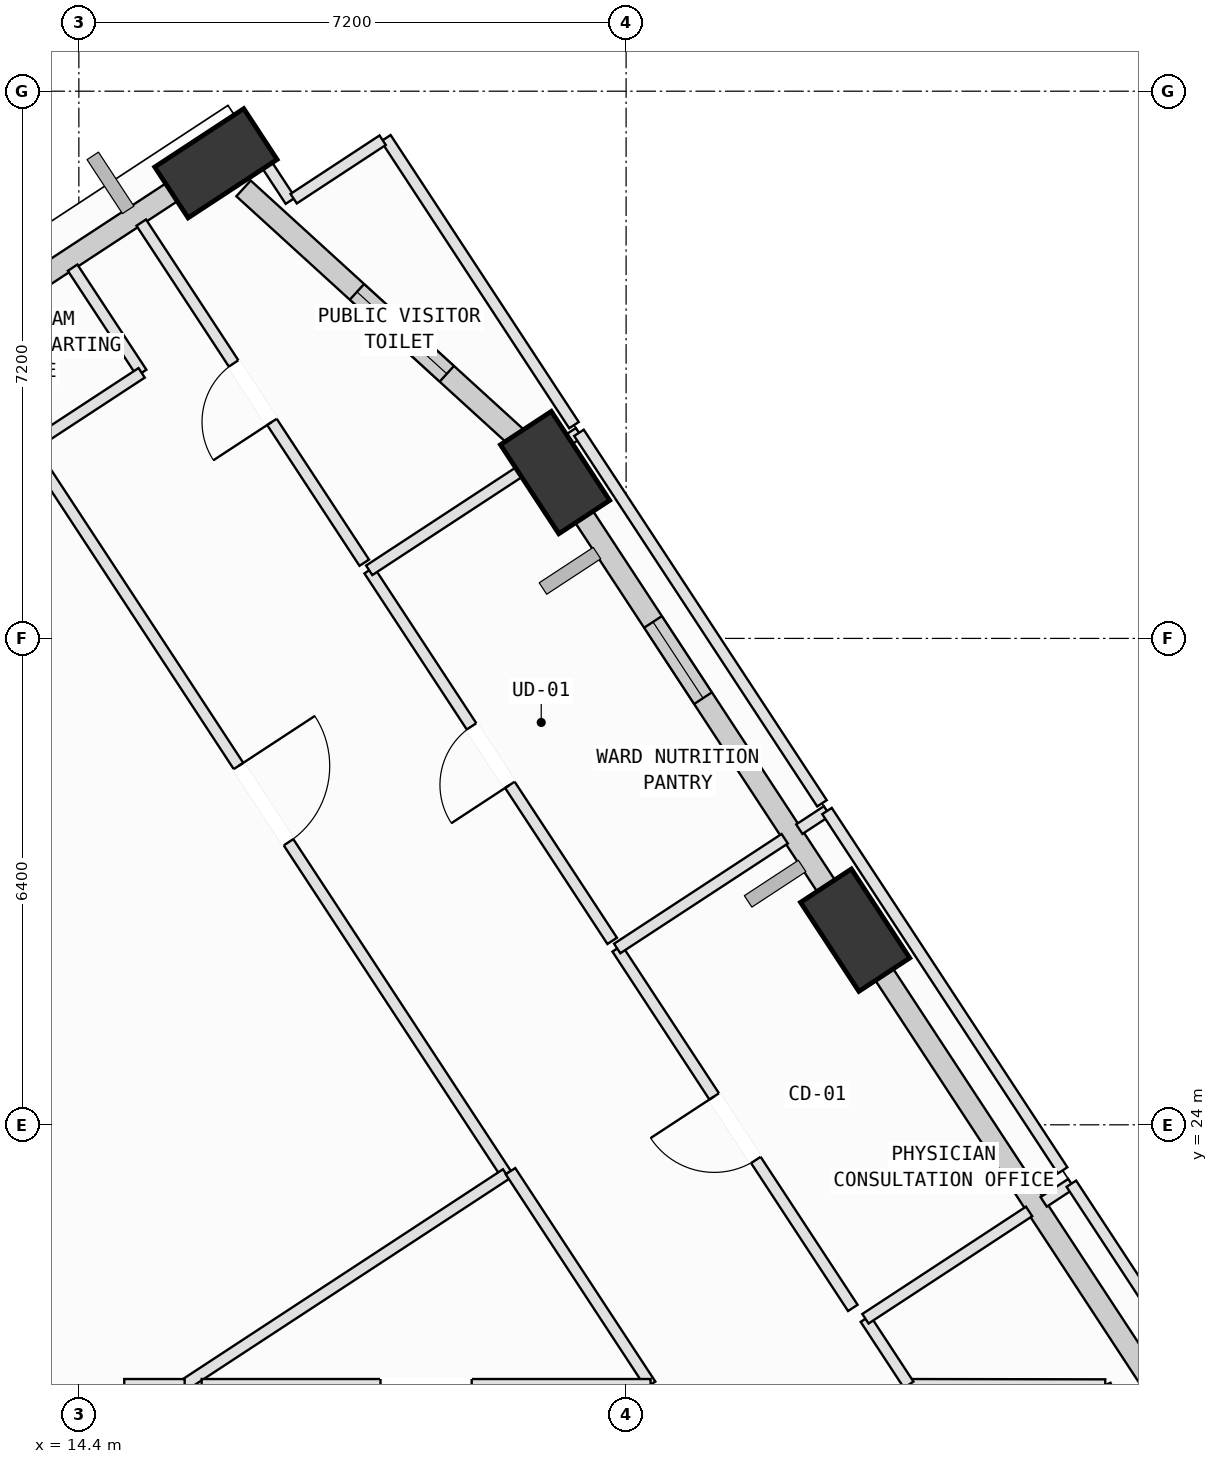
"""IFC4 building model, lengths in metres.
Left out: names, types, materials, properties, quantities, classifications, styles, units other than length and angle.
Written with IfcOpenShell. Run it as: python <this file> out.ifc"""

import sys

from ifc_helpers import new_model, si_unit, direction, frame, frame_2d, origin, origin_2d, place, context, subcontext, project, spatial, rectangle, extrude, element, fill, save


model = new_model("IFC4")
c1 = context("Model", 3, precision=1e-05, world=origin(), true_north=direction((0.0, 1.0)))
c2 = subcontext(c1, "Body", "Model", "MODEL_VIEW")
j1 = project(units=[si_unit("LENGTHUNIT", "METRE"), si_unit("PLANEANGLEUNIT", "RADIAN")], contexts=[c1])
p1 = place(None, origin())
s1 = spatial("IfcSite", under=j1, at=p1, CompositionType="ELEMENT")
p2 = place(p1, origin())
s2 = spatial("IfcBuilding", under=s1, at=p2, CompositionType="ELEMENT")
p3 = place(p2, frame((0.0, 0.0, 165.8)))
s3 = spatial("IfcBuildingStorey", under=s2, at=p3, CompositionType="ELEMENT", Elevation=165.8)
p4 = place(p3, frame((28.863, 20.08, 0.002), z_axis=(0.019724836791, -0.019480566367, 0.99961564531), x_axis=(-0.553225254665, 0.832589411518, 0.027142023308)))
e1 = element("IfcColumn", 1, at=p4, inside=s3, PredefinedType="COLUMN", context=c2, shape_type="SweptSolid", body=[
    extrude(rectangle(XDim=1.4, YDim=0.8, at=origin_2d()), origin(), (0.0, 0.0, 1.0), 3.998),
])
p5 = place(p3, frame((24.613, 26.561, 0.002), z_axis=(-0.007020412857, -0.037299758743, 0.999279461313), x_axis=(-0.384257200508, 0.922680288149, 0.031740978557)))
e2 = element("IfcColumn", 2, at=p5, inside=s3, PredefinedType="COLUMN", context=c2, shape_type="SweptSolid", body=[
    extrude(rectangle(XDim=1.4, YDim=0.8, at=origin_2d()), origin(), (0.0, 0.0, 1.0), 3.999),
])
p6 = place(p3, frame((20.666, 32.582, 0.002), z_axis=(-0.031766312901, -0.053777136236, 0.99804755447), x_axis=(-0.047579985119, 0.997500791827, 0.052233277912)))
e3 = element("IfcColumn", 3, at=p6, inside=s3, PredefinedType="COLUMN", context=c2, shape_type="SweptSolid", body=[
    extrude(rectangle(XDim=1.4, YDim=0.8, at=origin_2d()), origin(), (0.0, 0.0, 1.0), 4.004),
])
p7 = place(p3, frame((16.204, 36.652, 0.002), z_axis=(-0.048383489363, -0.072240505501, 0.996213002988), x_axis=(0.998796364309, -0.011541167094, 0.047672047424)))
e4 = element("IfcColumn", 4, at=p7, inside=s3, PredefinedType="COLUMN", context=c2, shape_type="SweptSolid", body=[
    extrude(rectangle(XDim=1.4, YDim=0.8, at=origin_2d()), origin(), (0.0, 0.0, 1.0), 4.011),
])
p8 = place(p3, frame((28.62, 20.449, 0.0), z_axis=(0.0, 0.0, 1.0), x_axis=(-0.548274567117, 0.836298391158, 0.0)))
e5 = element("IfcWall", 5, at=p8, inside=s3, PredefinedType="SOLIDWALL", context=c2, shape_type="SweptSolid", body=[
    extrude(rectangle(XDim=6.76, YDim=0.28, at=frame_2d((3.38, 0.0))), origin(), (0.0, 0.0, 1.0), 3.165),
])
p9 = place(p3, frame((24.373, 26.928, 0.0), z_axis=(0.0, 0.0, 1.0), x_axis=(-0.548310186412, 0.836275038176, 0.0)))
e6 = element("IfcWall", 6, at=p9, inside=s3, PredefinedType="SOLIDWALL", context=c2, shape_type="SweptSolid", body=[
    extrude(rectangle(XDim=6.223, YDim=0.28, at=frame_2d((3.111, 0.0))), origin(), (0.0, 0.0, 1.0), 3.165),
])
p10 = place(p9, frame((3.211, 0.0, 0.75)))
e7 = element("IfcOpeningElement", 7, at=p10, cuts=e6, PredefinedType="OPENING", context=c2, shape_type="SweptSolid", body=[
    extrude(rectangle(XDim=1.2, YDim=1.75, at=frame_2d((0.6, 0.875))), frame((0.0, 0.15, 0.0), z_axis=(0.0, -1.0, 0.0), x_axis=(1.0, 0.0, 0.0)), (0.0, 0.0, 1.0), 0.3),
])
p11 = place(p3, frame((16.567, 36.321, 0.0), z_axis=(0.0, 0.0, 1.0), x_axis=(0.738817531131, -0.673905524308, 0.0)))
e8 = element("IfcWall", 8, at=p11, inside=s3, PredefinedType="SOLIDWALL", context=c2, shape_type="SweptSolid", body=[
    extrude(rectangle(XDim=5.093, YDim=0.28, at=frame_2d((2.546, 0.0))), origin(), (0.0, 0.0, 1.0), 3.165),
])
p12 = place(p11, frame((2.02, 0.0, 0.75)))
e9 = element("IfcOpeningElement", 9, at=p12, cuts=e8, PredefinedType="OPENING", context=c2, shape_type="SweptSolid", body=[
    extrude(rectangle(XDim=1.6, YDim=1.95, at=frame_2d((0.8, 0.975))), frame((0.0, 0.15, 0.0), z_axis=(0.0, -1.0, 0.0), x_axis=(1.0, 0.0, 0.0)), (0.0, 0.0, 1.0), 0.3),
])
p13 = place(p3, frame((9.611, 32.33, 0.0), z_axis=(0.0, 0.0, 1.0), x_axis=(0.836290304758, 0.548286901327, 0.0)))
e10 = element("IfcWall", 10, at=p13, inside=s3, PredefinedType="SOLIDWALL", context=c2, shape_type="SweptSolid", body=[
    extrude(rectangle(XDim=7.231, YDim=0.28, at=frame_2d((3.615, 0.0))), origin(), (0.0, 0.0, 1.0), 3.165),
])
p14 = place(p3, frame((13.638, 33.087, 0.0), z_axis=(0.0, 0.0, 1.0), x_axis=(0.548329312424, -0.836262497746, 0.0)))
e11 = element("IfcWall", 11, at=p14, inside=s3, PredefinedType="PARTITIONING", context=c2, shape_type="SweptSolid", body=[
    extrude(rectangle(XDim=11.641, YDim=0.15, at=frame_2d((5.82, 0.0))), origin(), (0.0, 0.0, 1.0), 3.78),
])
p15 = place(p14, frame((5.22, 0.0, 0.0)))
e12 = element("IfcOpeningElement", 12, at=p15, cuts=e11, PredefinedType="OPENING", context=c2, shape_type="SweptSolid", body=[
    extrude(rectangle(XDim=1.2, YDim=2.15, at=frame_2d((0.6, 1.075))), frame((0.0, 0.085, 0.0), z_axis=(0.0, -1.0, 0.0), x_axis=(1.0, 0.0, 0.0)), (0.0, 0.0, 1.0), 0.17),
])
p16 = place(p3, frame((20.021, 23.352, 0.0), z_axis=(0.0, 0.0, 1.0), x_axis=(-0.836348158254, -0.548198648471, 0.0)))
e13 = element("IfcWall", 13, at=p16, inside=s3, PredefinedType="PARTITIONING", context=c2, shape_type="SweptSolid", body=[
    extrude(rectangle(XDim=5.056, YDim=0.15, at=frame_2d((2.528, 0.0))), origin(), (0.0, 0.0, 1.0), 3.78),
])
p17 = place(p3, frame((15.792, 20.58, 0.0), z_axis=(0.0, 0.0, 1.0), x_axis=(-1.0, 0.0, 0.0)))
e14 = element("IfcWall", 14, at=p17, inside=s3, PredefinedType="PARTITIONING", context=c2, shape_type="SweptSolid", body=[
    extrude(rectangle(XDim=0.795, YDim=0.15, at=frame_2d((0.397, 0.0))), origin(), (0.0, 0.0, 1.0), 3.78),
])
p18 = place(p3, frame((28.096, 20.131, 0.0), z_axis=(0.0, 0.0, 1.0), x_axis=(-0.396107773703, 0.918204025047, 0.0)))
e15 = element("IfcWall", 15, at=p18, inside=s3, PredefinedType="PARTITIONING", context=c2, shape_type="SweptSolid", body=[
    extrude(rectangle(XDim=0.484, YDim=0.15, at=frame_2d((0.242, 0.0))), origin(), (0.0, 0.0, 1.0), 3.78),
])
p19 = place(p3, frame((27.904, 20.576, 0.0), z_axis=(0.0, 0.0, 1.0), x_axis=(-0.999998712014, 0.001604982827, 0.0)))
e16 = element("IfcWall", 16, at=p19, inside=s3, PredefinedType="PARTITIONING", context=c2, shape_type="SweptSolid", body=[
    extrude(rectangle(XDim=2.586, YDim=0.15, at=frame_2d((1.293, 0.0))), origin(), (0.0, 0.0, 1.0), 3.78),
])
p20 = place(p3, frame((25.318, 20.58, 0.0), z_axis=(0.0, 0.0, 1.0), x_axis=(-0.548332691365, 0.836260282197, 0.0)))
e17 = element("IfcWall", 17, at=p20, inside=s3, PredefinedType="PARTITIONING", context=c2, shape_type="SweptSolid", body=[
    extrude(rectangle(XDim=1.038, YDim=0.15, at=frame_2d((0.519, 0.0))), origin(), (0.0, 0.0, 1.0), 3.415),
])
p21 = place(p3, frame((24.749, 21.448, 0.0), z_axis=(0.0, 0.0, 1.0), x_axis=(0.836198746425, 0.548426527874, 0.0)))
e18 = element("IfcWall", 18, at=p21, inside=s3, PredefinedType="PARTITIONING", context=c2, shape_type="SweptSolid", body=[
    extrude(rectangle(XDim=2.575, YDim=0.15, at=frame_2d((1.288, 0.0))), origin(), (0.0, 0.0, 1.0), 3.78),
])
p22 = place(p3, frame((27.094, 22.986, 0.0), z_axis=(0.0, 0.0, 1.0), x_axis=(0.835911265281, 0.548864606781, 0.0)))
e19 = element("IfcWall", 19, at=p22, inside=s3, PredefinedType="PARTITIONING", context=c2, shape_type="SweptSolid", body=[
    extrude(rectangle(XDim=0.436, YDim=0.15, at=frame_2d((0.218, 0.0))), origin(), (0.0, 0.0, 1.0), 3.78),
])
p23 = place(p3, frame((27.458, 23.225, 0.0), z_axis=(0.0, 0.0, 1.0), x_axis=(0.548280379418, -0.836294580603, 0.0)))
e20 = element("IfcWall", 20, at=p23, inside=s3, PredefinedType="PARTITIONING", context=c2, shape_type="SweptSolid", body=[
    extrude(rectangle(XDim=2.851, YDim=0.15, at=frame_2d((1.425, 0.0))), origin(), (0.0, 0.0, 1.0), 3.78),
])
p24 = place(p3, frame((24.583, 21.591, 0.0), z_axis=(0.0, 0.0, 1.0), x_axis=(-0.548247074475, 0.8363164146, 0.0)))
e21 = element("IfcWall", 21, at=p24, inside=s3, PredefinedType="PARTITIONING", context=c2, shape_type="SweptSolid", body=[
    extrude(rectangle(XDim=5.655, YDim=0.15, at=frame_2d((2.827, 0.0))), origin(), (0.0, 0.0, 1.0), 3.415),
])
p25 = place(p24, frame((2.327, 0.0, 0.0)))
e22 = element("IfcOpeningElement", 22, at=p25, cuts=e21, PredefinedType="OPENING", context=c2, shape_type="SweptSolid", body=[
    extrude(rectangle(XDim=1.0, YDim=2.12, at=frame_2d((0.5, 1.06))), frame((0.0, 0.085, 0.0), z_axis=(0.0, -1.0, 0.0), x_axis=(1.0, 0.0, 0.0)), (0.0, 0.0, 1.0), 0.17),
])
p26 = place(p3, frame((21.483, 26.32, 0.0), z_axis=(0.0, 0.0, 1.0), x_axis=(0.836499207519, 0.547968133946, 0.0)))
e23 = element("IfcWall", 23, at=p26, inside=s3, PredefinedType="PARTITIONING", context=c2, shape_type="SweptSolid", body=[
    extrude(rectangle(XDim=2.635, YDim=0.15, at=frame_2d((1.317, 0.0))), origin(), (0.0, 0.0, 1.0), 3.78),
])
p27 = place(p3, frame((23.879, 27.89, 0.0), z_axis=(0.0, 0.0, 1.0), x_axis=(0.835911265281, 0.548864606781, 0.0)))
e24 = element("IfcWall", 24, at=p27, inside=s3, PredefinedType="PARTITIONING", context=c2, shape_type="SweptSolid", body=[
    extrude(rectangle(XDim=0.436, YDim=0.15, at=frame_2d((0.218, 0.0))), origin(), (0.0, 0.0, 1.0), 3.78),
])
p28 = place(p3, frame((24.243, 28.129, 0.0), z_axis=(0.0, 0.0, 1.0), x_axis=(0.548247074475, -0.8363164146, 0.0)))
e25 = element("IfcWall", 25, at=p28, inside=s3, PredefinedType="PARTITIONING", context=c2, shape_type="SweptSolid", body=[
    extrude(rectangle(XDim=5.655, YDim=0.15, at=frame_2d((2.827, 0.0))), origin(), (0.0, 0.0, 1.0), 3.78),
])
p29 = place(p3, frame((21.417, 26.42, 0.0), z_axis=(0.0, 0.0, 1.0), x_axis=(-0.548316159606, 0.836271121775, 0.0)))
e26 = element("IfcWall", 26, at=p29, inside=s3, PredefinedType="PARTITIONING", context=c2, shape_type="SweptSolid", body=[
    extrude(rectangle(XDim=5.831, YDim=0.15, at=frame_2d((2.915, 0.0))), origin(), (0.0, 0.0, 1.0), 3.78),
])
p30 = place(p29, frame((2.455, 0.0, 0.0)))
e27 = element("IfcOpeningElement", 27, at=p30, cuts=e26, PredefinedType="OPENING", context=c2, shape_type="SweptSolid", body=[
    extrude(rectangle(XDim=0.92, YDim=2.1, at=frame_2d((0.46, 1.05))), frame((0.0, 0.085, 0.0), z_axis=(0.0, -1.0, 0.0), x_axis=(1.0, 0.0, 0.0)), (0.0, 0.0, 1.0), 0.17),
])
p31 = place(p3, frame((18.22, 31.296, 0.0), z_axis=(0.0, 0.0, 1.0), x_axis=(0.836350018485, 0.548195810436, 0.0)))
e28 = element("IfcWall", 28, at=p31, inside=s3, PredefinedType="PARTITIONING", context=c2, shape_type="SweptSolid", body=[
    extrude(rectangle(XDim=3.3, YDim=0.15, at=frame_2d((1.65, 0.0))), origin(), (0.0, 0.0, 1.0), 3.78),
])
p32 = place(p3, frame((20.98, 33.105, 0.0), z_axis=(0.0, 0.0, 1.0), x_axis=(0.548392968486, -0.836220755611, 0.0)))
e29 = element("IfcWall", 29, at=p32, inside=s3, PredefinedType="PARTITIONING", context=c2, shape_type="SweptSolid", body=[
    extrude(rectangle(XDim=5.83, YDim=0.15, at=frame_2d((2.915, 0.0))), origin(), (0.0, 0.0, 1.0), 3.78),
])
p33 = place(p3, frame((18.439, 36.982, 0.0), z_axis=(0.0, 0.0, 1.0), x_axis=(0.548219331608, -0.836334600774, 0.0)))
e30 = element("IfcWall", 30, at=p33, inside=s3, PredefinedType="PARTITIONING", context=c2, shape_type="SweptSolid", body=[
    extrude(rectangle(XDim=4.515, YDim=0.15, at=frame_2d((2.257, 0.0))), origin(), (0.0, 0.0, 1.0), 3.78),
])
p34 = place(p3, frame((18.155, 31.396, 0.0), z_axis=(0.0, 0.0, 1.0), x_axis=(-0.548303612182, 0.836279348584, 0.0)))
e31 = element("IfcWall", 31, at=p34, inside=s3, PredefinedType="PARTITIONING", context=c2, shape_type="SweptSolid", body=[
    extrude(rectangle(XDim=5.351, YDim=0.15, at=frame_2d((2.676, 0.0))), origin(), (0.0, 0.0, 1.0), 3.78),
])
p35 = place(p34, frame((2.216, 0.0, 0.0)))
e32 = element("IfcOpeningElement", 32, at=p35, cuts=e31, PredefinedType="OPENING", context=c2, shape_type="SweptSolid", body=[
    extrude(rectangle(XDim=0.92, YDim=2.1, at=frame_2d((0.46, 1.05))), frame((0.0, 0.085, 0.0), z_axis=(0.0, -1.0, 0.0), x_axis=(1.0, 0.0, 0.0)), (0.0, 0.0, 1.0), 0.17),
])
p36 = place(p3, frame((15.554, 36.454, 0.0), z_axis=(0.0, 0.0, 1.0), x_axis=(0.836679505215, 0.547692802175, 0.0)))
e33 = element("IfcWall", 33, at=p36, inside=s3, PredefinedType="PARTITIONING", context=c2, shape_type="SweptSolid", body=[
    extrude(rectangle(XDim=1.201, YDim=0.15, at=frame_2d((0.601, 0.0))), origin(), (0.0, 0.0, 1.0), 3.165),
])
p37 = place(p3, frame((16.586, 37.07, 0.0), z_axis=(0.0, 0.0, 1.0), x_axis=(0.548793431799, -0.835957994887, 0.0)))
e34 = element("IfcWall", 34, at=p37, inside=s3, PredefinedType="PARTITIONING", context=c2, shape_type="SweptSolid", body=[
    extrude(rectangle(XDim=1.09, YDim=0.15, at=frame_2d((0.545, 0.0))), origin(), (0.0, 0.0, 1.0), 3.78),
])
p38 = place(p3, frame((17.226, 36.186, 0.0), z_axis=(0.0, 0.0, 1.0), x_axis=(0.83583800214, 0.548976169045, 0.0)))
e35 = element("IfcWall", 35, at=p38, inside=s3, PredefinedType="PARTITIONING", context=c2, shape_type="SweptSolid", body=[
    extrude(rectangle(XDim=1.401, YDim=0.15, at=frame_2d((0.7, 0.0))), origin(), (0.0, 0.0, 1.0), 3.78),
])
p39 = place(p3, frame((20.079, 23.39, 0.0), z_axis=(0.0, 0.0, 1.0), x_axis=(0.54846440247, -0.836173904892, 0.0)))
e36 = element("IfcWall", 36, at=p39, inside=s3, PredefinedType="PARTITIONING", context=c2, shape_type="SweptSolid", body=[
    extrude(rectangle(XDim=3.36, YDim=0.15, at=frame_2d((1.68, 0.0))), origin(), (0.0, 0.0, 1.0), 3.78),
])
p40 = place(p3, frame((21.922, 20.58, 0.0), z_axis=(0.0, 0.0, 1.0), x_axis=(-1.0, 0.0, 0.0)))
e37 = element("IfcWall", 37, at=p40, inside=s3, PredefinedType="PARTITIONING", context=c2, shape_type="SweptSolid", body=[
    extrude(rectangle(XDim=5.907, YDim=0.15, at=frame_2d((2.954, 0.0))), origin(), (0.0, 0.0, 1.0), 3.78),
])
p41 = place(p40, frame((2.354, 0.0, 0.0)))
e38 = element("IfcOpeningElement", 38, at=p41, cuts=e37, PredefinedType="OPENING", context=c2, shape_type="SweptSolid", body=[
    extrude(rectangle(XDim=1.2, YDim=2.15, at=frame_2d((0.6, 1.075))), frame((0.0, 0.085, 0.0), z_axis=(0.0, -1.0, 0.0), x_axis=(1.0, 0.0, 0.0)), (0.0, 0.0, 1.0), 0.17),
])
p42 = place(p3, frame((14.318, 35.278, 0.0), z_axis=(0.0, 0.0, 1.0), x_axis=(0.548524345856, -0.836134583667, 0.0)))
e39 = element("IfcWall", 39, at=p42, inside=s3, PredefinedType="PARTITIONING", context=c2, shape_type="SweptSolid", body=[
    extrude(rectangle(XDim=1.655, YDim=0.15, at=frame_2d((0.828, 0.0))), origin(), (0.0, 0.0, 1.0), 3.78),
])
p43 = place(p3, frame((15.226, 33.894, 0.0), z_axis=(0.0, 0.0, 1.0), x_axis=(-0.836380380156, -0.548149486628, 0.0)))
e40 = element("IfcWall", 40, at=p43, inside=s3, PredefinedType="PARTITIONING", context=c2, shape_type="SweptSolid", body=[
    extrude(rectangle(XDim=1.673, YDim=0.15, at=frame_2d((0.836, 0.0))), origin(), (0.0, 0.0, 1.0), 3.78),
])
p44 = place(p10, origin())
e41 = element("IfcWindow", 41, at=p44, inside=s3, PartitioningType="SINGLE_PANEL", PredefinedType="WINDOW", context=c2, shape_type="SweptSolid", body=[
    extrude(rectangle(XDim=1.2, YDim=1.75, at=frame_2d((0.6, 0.875))), frame((0.0, 0.03, 0.0), z_axis=(0.0, -1.0, 0.0), x_axis=(1.0, 0.0, 0.0)), (0.0, 0.0, 1.0), 0.06),
])
fill(e7, e41)
p45 = place(p12, origin())
e42 = element("IfcWindow", 42, at=p45, inside=s3, PartitioningType="SINGLE_PANEL", PredefinedType="WINDOW", context=c2, shape_type="SweptSolid", body=[
    extrude(rectangle(XDim=1.6, YDim=1.95, at=frame_2d((0.8, 0.975))), frame((0.0, 0.03, 0.0), z_axis=(0.0, -1.0, 0.0), x_axis=(1.0, 0.0, 0.0)), (0.0, 0.0, 1.0), 0.06),
])
fill(e9, e42)
p46 = place(p15, origin())
e43 = element("IfcDoor", 43, at=p46, inside=s3, OperationType="SINGLE_SWING_LEFT", PredefinedType="DOOR", context=c2, shape_type="SweptSolid", body=[
    extrude(rectangle(XDim=1.2, YDim=2.15, at=frame_2d((0.6, 1.075))), frame((0.0, 0.025, 0.0), z_axis=(0.0, -1.0, 0.0), x_axis=(1.0, 0.0, 0.0)), (0.0, 0.0, 1.0), 0.05),
])
fill(e12, e43)
p47 = place(p25, origin())
e44 = element("IfcDoor", 44, at=p47, inside=s3, OperationType="SINGLE_SWING_RIGHT", PredefinedType="DOOR", context=c2, shape_type="SweptSolid", body=[
    extrude(rectangle(XDim=1.0, YDim=2.12, at=frame_2d((0.5, 1.06))), frame((0.0, 0.025, 0.0), z_axis=(0.0, -1.0, 0.0), x_axis=(1.0, 0.0, 0.0)), (0.0, 0.0, 1.0), 0.05),
])
fill(e22, e44)
p48 = place(p30, origin())
e45 = element("IfcDoor", 45, at=p48, inside=s3, OperationType="SINGLE_SWING_LEFT", PredefinedType="DOOR", context=c2, shape_type="SweptSolid", body=[
    extrude(rectangle(XDim=0.92, YDim=2.1, at=frame_2d((0.46, 1.05))), frame((0.0, 0.025, 0.0), z_axis=(0.0, -1.0, 0.0), x_axis=(1.0, 0.0, 0.0)), (0.0, 0.0, 1.0), 0.05),
])
fill(e27, e45)
p49 = place(p35, origin())
e46 = element("IfcDoor", 46, at=p49, inside=s3, OperationType="SINGLE_SWING_LEFT", PredefinedType="DOOR", context=c2, shape_type="SweptSolid", body=[
    extrude(rectangle(XDim=0.92, YDim=2.1, at=frame_2d((0.46, 1.05))), frame((0.0, 0.025, 0.0), z_axis=(0.0, -1.0, 0.0), x_axis=(1.0, 0.0, 0.0)), (0.0, 0.0, 1.0), 0.05),
])
fill(e32, e46)
p50 = place(p41, origin())
e47 = element("IfcDoor", 47, at=p50, inside=s3, OperationType="SINGLE_SWING_LEFT", PredefinedType="DOOR", context=c2, shape_type="SweptSolid", body=[
    extrude(rectangle(XDim=1.2, YDim=2.15, at=frame_2d((0.6, 1.075))), frame((0.0, 0.025, 0.0), z_axis=(0.0, -1.0, 0.0), x_axis=(1.0, 0.0, 0.0)), (0.0, 0.0, 1.0), 0.05),
])
fill(e38, e47)
save(model, sys.argv[1])
